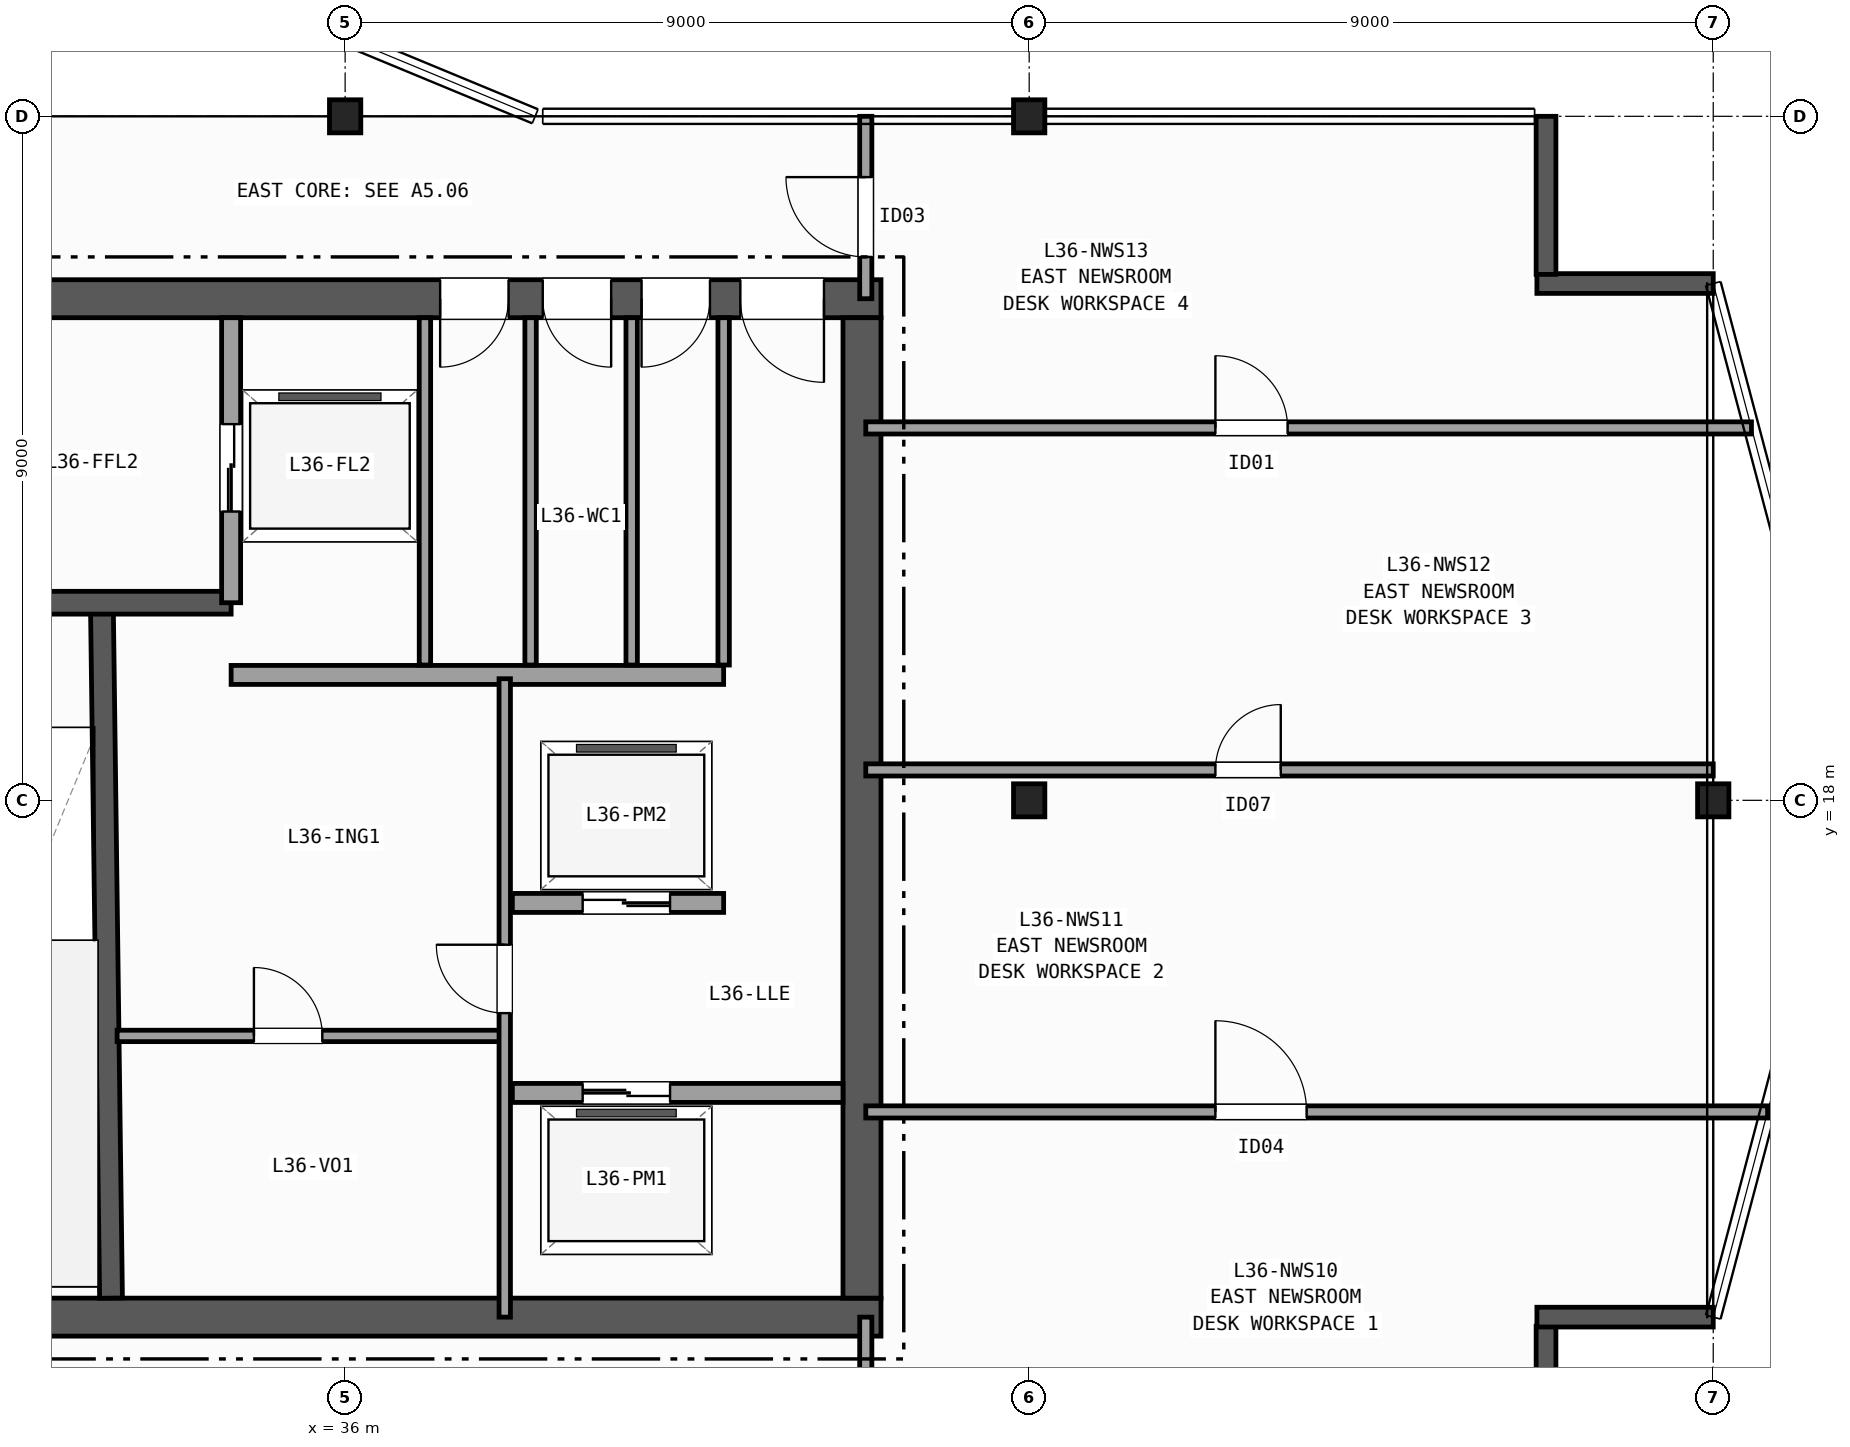
"""IFC4 building model, lengths in metres.
Left out: names, types, materials, properties, quantities, classifications, styles, units other than length and angle.
Written with IfcOpenShell. Run it as: python <this file> out.ifc"""

import sys

from ifc_helpers import new_model, si_unit, direction, frame, frame_2d, origin, origin_2d, place, context, subcontext, project, spatial, rectangle, i_section, extrude, element, fill, save


model = new_model("IFC4")
c1 = context("Model", 3, precision=1e-05, world=origin(), true_north=direction((0.0, 1.0)))
c2 = subcontext(c1, "Body", "Model", "MODEL_VIEW")
j1 = project(units=[si_unit("LENGTHUNIT", "METRE"), si_unit("PLANEANGLEUNIT", "RADIAN")], contexts=[c1])
p1 = place(None, origin())
s1 = spatial("IfcSite", under=j1, at=p1, CompositionType="ELEMENT")
p2 = place(p1, origin())
s2 = spatial("IfcBuilding", under=s1, at=p2, CompositionType="ELEMENT")
p3 = place(p2, frame((0.0, 0.0, 147.0)))
s3 = spatial("IfcBuildingStorey", under=s2, at=p3, CompositionType="ELEMENT", Elevation=147.0)
for number, where, z_axis, x_axis in (
    (1, (36.0, 27.0, 0.0), (0.0, 0.0, 1.0), (1.0, 0.0, 0.0)),
    (2, (45.0, 18.0, 0.0), (0.0, 0.0, 1.0), (1.0, 0.0, 0.0)),
    (3, (45.0, 27.0, 0.0), (0.0, 0.0, 1.0), (1.0, 0.0, 0.0)),
    (4, (54.0, 18.0, 0.0), (0.0, 0.0, 1.0), (1.0, 0.0, 0.0)),
):
    element("IfcColumn", number, at=place(p3, frame(where, z_axis=z_axis, x_axis=x_axis)), inside=s3, PredefinedType="COLUMN", context=c2, shape_type="SweptSolid", body=[
        extrude(i_section(OverallWidth=0.412, OverallDepth=0.435, WebThickness=0.036, FlangeThickness=0.057, FilletRadius=0.015, at=origin_2d()), origin(), (0.0, 0.0, 1.0), 3.7),
    ])
p4 = place(p3, frame((51.8, 9.0, 0.0), z_axis=(0.0, 0.0, 1.0), x_axis=(0.0, 1.0, 0.0)))
e5 = element("IfcWall", 5, at=p4, inside=s3, PredefinedType="SOLIDWALL", context=c2, shape_type="SweptSolid", body=[
    extrude(rectangle(XDim=2.08, YDim=0.26, at=frame_2d((1.04, 0.0))), origin(), (0.0, 0.0, 1.0), 3.42),
])
for number, where, z_axis, x_axis in (
    (6, (51.68, 11.2, 0.0), (0.0, 0.0, 1.0), (1.0, 0.0, 0.0)),
    (7, (54.0, 24.8, 0.0), (0.0, 0.0, 1.0), (-1.0, 0.0, 0.0)),
):
    element("IfcWall", number, at=place(p3, frame(where, z_axis=z_axis, x_axis=x_axis)), inside=s3, PredefinedType="SOLIDWALL", context=c2, shape_type="SweptSolid", body=[
        extrude(rectangle(XDim=2.32, YDim=0.26, at=frame_2d((1.16, 0.0))), origin(), (0.0, 0.0, 1.0), 3.42),
    ])
p5 = place(p3, frame((51.8, 24.92, 0.0), z_axis=(0.0, 0.0, 1.0), x_axis=(0.0, 1.0, 0.0)))
e8 = element("IfcWall", 8, at=p5, inside=s3, PredefinedType="SOLIDWALL", context=c2, shape_type="SweptSolid", body=[
    extrude(rectangle(XDim=2.08, YDim=0.26, at=frame_2d((1.04, 0.0))), origin(), (0.0, 0.0, 1.0), 3.42),
])
p6 = place(p3, frame((29.15, 11.2, 0.0), z_axis=(0.0, 0.0, 1.0), x_axis=(1.0, 0.0, 0.0)))
e9 = element("IfcWall", 9, at=p6, inside=s3, PredefinedType="SHEAR", context=c2, shape_type="SweptSolid", body=[
    extrude(rectangle(XDim=13.9, YDim=0.5, at=frame_2d((6.95, 0.0))), origin(), (0.0, 0.0, 1.0), 3.42),
])
p7 = place(p3, frame((43.05, 24.6, 0.0), z_axis=(0.0, 0.0, 1.0), x_axis=(-1.0, 0.0, 0.0)))
e10 = element("IfcWall", 10, at=p7, inside=s3, PredefinedType="SHEAR", context=c2, shape_type="SweptSolid", body=[
    extrude(rectangle(XDim=13.9, YDim=0.5, at=frame_2d((6.95, 0.0))), origin(), (0.0, 0.0, 1.0), 3.42),
])
p8 = place(p7, frame((0.75, 0.0, 0.0)))
e11 = element("IfcOpeningElement", 11, at=p8, cuts=e10, PredefinedType="OPENING", context=c2, shape_type="SweptSolid", body=[
    extrude(rectangle(XDim=1.1, YDim=2.15, at=frame_2d((0.55, 1.075))), frame((0.0, 0.26, 0.0), z_axis=(0.0, -1.0, 0.0), x_axis=(1.0, 0.0, 0.0)), (0.0, 0.0, 1.0), 0.52),
])
p9 = place(p7, frame((2.25, 0.0, 0.0)))
e12 = element("IfcOpeningElement", 12, at=p9, cuts=e10, PredefinedType="OPENING", context=c2, shape_type="SweptSolid", body=[
    extrude(rectangle(XDim=0.9, YDim=2.1, at=frame_2d((0.45, 1.05))), frame((0.0, 0.26, 0.0), z_axis=(0.0, -1.0, 0.0), x_axis=(1.0, 0.0, 0.0)), (0.0, 0.0, 1.0), 0.52),
])
p10 = place(p7, frame((3.55, 0.0, 0.0)))
e13 = element("IfcOpeningElement", 13, at=p10, cuts=e10, PredefinedType="OPENING", context=c2, shape_type="SweptSolid", body=[
    extrude(rectangle(XDim=0.9, YDim=2.1, at=frame_2d((0.45, 1.05))), frame((0.0, 0.26, 0.0), z_axis=(0.0, -1.0, 0.0), x_axis=(1.0, 0.0, 0.0)), (0.0, 0.0, 1.0), 0.52),
])
p11 = place(p7, frame((4.9, 0.0, 0.0)))
e14 = element("IfcOpeningElement", 14, at=p11, cuts=e10, PredefinedType="OPENING", context=c2, shape_type="SweptSolid", body=[
    extrude(rectangle(XDim=0.9, YDim=2.1, at=frame_2d((0.45, 1.05))), frame((0.0, 0.26, 0.0), z_axis=(0.0, -1.0, 0.0), x_axis=(1.0, 0.0, 0.0)), (0.0, 0.0, 1.0), 0.52),
])
p12 = place(p3, frame((42.8, 11.45, 0.0), z_axis=(0.0, 0.0, 1.0), x_axis=(0.0, 1.0, 0.0)))
e15 = element("IfcWall", 15, at=p12, inside=s3, PredefinedType="SHEAR", context=c2, shape_type="SweptSolid", body=[
    extrude(rectangle(XDim=12.9, YDim=0.5, at=frame_2d((6.45, 0.0))), origin(), (0.0, 0.0, 1.0), 3.42),
])
p13 = place(p3, frame((32.92, 11.45, 0.0), z_axis=(0.0, 0.0, 1.0), x_axis=(-0.013171578211, 0.999913251001, 0.0)))
e16 = element("IfcWall", 16, at=p13, inside=s3, PredefinedType="SHEAR", context=c2, shape_type="SweptSolid", body=[
    extrude(rectangle(XDim=9.101, YDim=0.3, at=frame_2d((4.55, 0.0))), origin(), (0.0, 0.0, 1.0), 3.42),
])
p14 = place(p3, frame((34.5, 20.6, 0.0), z_axis=(0.0, 0.0, 1.0), x_axis=(-1.0, 0.0, 0.0)))
e17 = element("IfcWall", 17, at=p14, inside=s3, PredefinedType="SHEAR", context=c2, shape_type="SweptSolid", body=[
    extrude(rectangle(XDim=4.85, YDim=0.3, at=frame_2d((2.425, 0.0))), origin(), (0.0, 0.0, 1.0), 3.42),
])
p15 = place(p14, frame((2.7, 0.0, 0.0)))
e18 = element("IfcOpeningElement", 18, at=p15, cuts=e17, PredefinedType="OPENING", context=c2, shape_type="SweptSolid", body=[
    extrude(rectangle(XDim=1.2, YDim=2.15, at=frame_2d((0.6, 1.075))), frame((0.0, 0.16, 0.0), z_axis=(0.0, -1.0, 0.0), x_axis=(1.0, 0.0, 0.0)), (0.0, 0.0, 1.0), 0.32),
])
p16 = place(p3, frame((34.5, 20.6, 0.0), z_axis=(0.0, 0.0, 1.0), x_axis=(0.0, 1.0, 0.0)))
e19 = element("IfcWall", 19, at=p16, inside=s3, PredefinedType="PARTITIONING", context=c2, shape_type="SweptSolid", body=[
    extrude(rectangle(XDim=3.75, YDim=0.25, at=frame_2d((1.875, 0.0))), origin(), (0.0, 0.0, 1.0), 3.42),
])
p17 = place(p16, frame((1.2, 0.0, 0.0)))
e20 = element("IfcOpeningElement", 20, at=p17, cuts=e19, PredefinedType="OPENING", context=c2, shape_type="SweptSolid", body=[
    extrude(rectangle(XDim=1.15, YDim=2.15, at=frame_2d((0.575, 1.075))), frame((0.0, 0.135, 0.0), z_axis=(0.0, -1.0, 0.0), x_axis=(1.0, 0.0, 0.0)), (0.0, 0.0, 1.0), 0.27),
])
p18 = place(p3, frame((34.5, 19.65, 0.0), z_axis=(0.0, 0.0, 1.0), x_axis=(1.0, 0.0, 0.0)))
e21 = element("IfcWall", 21, at=p18, inside=s3, PredefinedType="PARTITIONING", context=c2, shape_type="SweptSolid", body=[
    extrude(rectangle(XDim=6.48, YDim=0.25, at=frame_2d((3.24, 0.0))), origin(), (0.0, 0.0, 1.0), 3.42),
])
p19 = place(p3, frame((38.2, 14.15, 0.0), z_axis=(0.0, 0.0, 1.0), x_axis=(1.0, 0.0, 0.0)))
e22 = element("IfcWall", 22, at=p19, inside=s3, PredefinedType="PARTITIONING", context=c2, shape_type="SweptSolid", body=[
    extrude(rectangle(XDim=4.35, YDim=0.25, at=frame_2d((2.175, 0.0))), origin(), (0.0, 0.0, 1.0), 3.42),
])
p20 = place(p19, frame((0.925, 0.0, 0.0)))
e23 = element("IfcOpeningElement", 23, at=p20, cuts=e22, PredefinedType="OPENING", context=c2, shape_type="SweptSolid", body=[
    extrude(rectangle(XDim=1.15, YDim=2.15, at=frame_2d((0.575, 1.075))), frame((0.0, 0.135, 0.0), z_axis=(0.0, -1.0, 0.0), x_axis=(1.0, 0.0, 0.0)), (0.0, 0.0, 1.0), 0.27),
])
p21 = place(p3, frame((40.98, 16.65, 0.0), z_axis=(0.0, 0.0, 1.0), x_axis=(-1.0, 0.0, 0.0)))
e24 = element("IfcWall", 24, at=p21, inside=s3, PredefinedType="PARTITIONING", context=c2, shape_type="SweptSolid", body=[
    extrude(rectangle(XDim=2.78, YDim=0.25, at=frame_2d((1.39, 0.0))), origin(), (0.0, 0.0, 1.0), 3.42),
])
p22 = place(p21, frame((0.705, 0.0, 0.0)))
e25 = element("IfcOpeningElement", 25, at=p22, cuts=e24, PredefinedType="OPENING", context=c2, shape_type="SweptSolid", body=[
    extrude(rectangle(XDim=1.15, YDim=2.15, at=frame_2d((0.575, 1.075))), frame((0.0, 0.135, 0.0), z_axis=(0.0, -1.0, 0.0), x_axis=(1.0, 0.0, 0.0)), (0.0, 0.0, 1.0), 0.27),
])
p23 = place(p3, frame((33.0, 14.9, 0.0), z_axis=(0.0, 0.0, 1.0), x_axis=(1.0, 0.0, 0.0)))
e26 = element("IfcWall", 26, at=p23, inside=s3, PredefinedType="PARTITIONING", context=c2, shape_type="SweptSolid", body=[
    extrude(rectangle(XDim=5.1, YDim=0.15, at=frame_2d((2.55, 0.0))), origin(), (0.0, 0.0, 1.0), 3.42),
])
p24 = place(p23, frame((1.8, 0.0, 0.0)))
e27 = element("IfcOpeningElement", 27, at=p24, cuts=e26, PredefinedType="OPENING", context=c2, shape_type="SweptSolid", body=[
    extrude(rectangle(XDim=0.9, YDim=2.1, at=frame_2d((0.45, 1.05))), frame((0.0, 0.085, 0.0), z_axis=(0.0, -1.0, 0.0), x_axis=(1.0, 0.0, 0.0)), (0.0, 0.0, 1.0), 0.17),
])
p25 = place(p3, frame((38.1, 11.2, 0.0), z_axis=(0.0, 0.0, 1.0), x_axis=(0.0, 1.0, 0.0)))
e28 = element("IfcWall", 28, at=p25, inside=s3, PredefinedType="PARTITIONING", context=c2, shape_type="SweptSolid", body=[
    extrude(rectangle(XDim=8.4, YDim=0.15, at=frame_2d((4.2, 0.0))), origin(), (0.0, 0.0, 1.0), 3.42),
])
p26 = place(p25, frame((4.0, 0.0, 0.0)))
e29 = element("IfcOpeningElement", 29, at=p26, cuts=e28, PredefinedType="OPENING", context=c2, shape_type="SweptSolid", body=[
    extrude(rectangle(XDim=0.9, YDim=2.1, at=frame_2d((0.45, 1.05))), frame((0.0, 0.085, 0.0), z_axis=(0.0, -1.0, 0.0), x_axis=(1.0, 0.0, 0.0)), (0.0, 0.0, 1.0), 0.17),
])
for number, where, z_axis, x_axis in (
    (30, (37.05, 19.78, 0.0), (0.0, 0.0, 1.0), (0.0, 1.0, 0.0)),
    (31, (38.44, 19.78, 0.0), (0.0, 0.0, 1.0), (0.0, 1.0, 0.0)),
    (32, (39.77, 19.78, 0.0), (0.0, 0.0, 1.0), (0.0, 1.0, 0.0)),
    (33, (40.98, 19.78, 0.0), (0.0, 0.0, 1.0), (0.0, 1.0, 0.0)),
):
    element("IfcWall", number, at=place(p3, frame(where, z_axis=z_axis, x_axis=x_axis)), inside=s3, PredefinedType="PARTITIONING", context=c2, shape_type="SweptSolid", body=[
        extrude(rectangle(XDim=4.57, YDim=0.15, at=frame_2d((2.285, 0.0))), origin(), (0.0, 0.0, 1.0), 3.42),
    ])
p27 = place(p3, frame((42.85, 9.0, 0.0), z_axis=(0.0, 0.0, 1.0), x_axis=(0.0, 1.0, 0.0)))
e34 = element("IfcWall", 34, at=p27, inside=s3, PredefinedType="PARTITIONING", context=c2, shape_type="SweptSolid", body=[
    extrude(rectangle(XDim=2.2, YDim=0.16, at=frame_2d((1.1, 0.0))), origin(), (0.0, 0.0, 1.0), 2.634),
])
p28 = place(p3, frame((42.85, 24.6, 0.0), z_axis=(0.0, 0.0, 1.0), x_axis=(0.0, 1.0, 0.0)))
e35 = element("IfcWall", 35, at=p28, inside=s3, PredefinedType="PARTITIONING", context=c2, shape_type="SweptSolid", body=[
    extrude(rectangle(XDim=2.4, YDim=0.16, at=frame_2d((1.2, 0.0))), origin(), (0.0, 0.0, 1.0), 2.634),
])
p29 = place(p28, frame((0.55, 0.0, 0.0)))
e36 = element("IfcOpeningElement", 36, at=p29, cuts=e35, PredefinedType="OPENING", context=c2, shape_type="SweptSolid", body=[
    extrude(rectangle(XDim=1.05, YDim=2.15, at=frame_2d((0.525, 1.075))), frame((0.0, 0.09, 0.0), z_axis=(0.0, -1.0, 0.0), x_axis=(1.0, 0.0, 0.0)), (0.0, 0.0, 1.0), 0.18),
])
p30 = place(p3, frame((42.85, 13.9, 0.0), z_axis=(0.0, 0.0, 1.0), x_axis=(1.0, 0.0, 0.0)))
e37 = element("IfcWall", 37, at=p30, inside=s3, PredefinedType="PARTITIONING", context=c2, shape_type="SweptSolid", body=[
    extrude(rectangle(XDim=11.865, YDim=0.16, at=frame_2d((5.933, 0.0))), origin(), (0.0, 0.0, 1.0), 3.42),
])
p31 = place(p30, frame((4.6, 0.0, 0.0)))
e38 = element("IfcOpeningElement", 38, at=p31, cuts=e37, PredefinedType="OPENING", context=c2, shape_type="SweptSolid", body=[
    extrude(rectangle(XDim=1.2, YDim=2.15, at=frame_2d((0.6, 1.075))), frame((0.0, 0.09, 0.0), z_axis=(0.0, -1.0, 0.0), x_axis=(1.0, 0.0, 0.0)), (0.0, 0.0, 1.0), 0.18),
])
p32 = place(p3, frame((42.85, 18.4, 0.0), z_axis=(0.0, 0.0, 1.0), x_axis=(1.0, 0.0, 0.0)))
e39 = element("IfcWall", 39, at=p32, inside=s3, PredefinedType="PARTITIONING", context=c2, shape_type="SweptSolid", body=[
    extrude(rectangle(XDim=11.15, YDim=0.16, at=frame_2d((5.575, 0.0))), origin(), (0.0, 0.0, 1.0), 3.42),
])
p33 = place(p32, frame((4.6, 0.0, 0.0)))
e40 = element("IfcOpeningElement", 40, at=p33, cuts=e39, PredefinedType="OPENING", context=c2, shape_type="SweptSolid", body=[
    extrude(rectangle(XDim=0.86, YDim=2.05, at=frame_2d((0.43, 1.025))), frame((0.0, 0.09, 0.0), z_axis=(0.0, -1.0, 0.0), x_axis=(1.0, 0.0, 0.0)), (0.0, 0.0, 1.0), 0.18),
])
p34 = place(p3, frame((42.85, 22.9, 0.0), z_axis=(0.0, 0.0, 1.0), x_axis=(1.0, 0.0, 0.0)))
e41 = element("IfcWall", 41, at=p34, inside=s3, PredefinedType="PARTITIONING", context=c2, shape_type="SweptSolid", body=[
    extrude(rectangle(XDim=11.653, YDim=0.16, at=frame_2d((5.826, 0.0))), origin(), (0.0, 0.0, 1.0), 3.42),
])
p35 = place(p34, frame((4.6, 0.0, 0.0)))
e42 = element("IfcOpeningElement", 42, at=p35, cuts=e41, PredefinedType="OPENING", context=c2, shape_type="SweptSolid", body=[
    extrude(rectangle(XDim=0.95, YDim=2.1, at=frame_2d((0.475, 1.05))), frame((0.0, 0.09, 0.0), z_axis=(0.0, -1.0, 0.0), x_axis=(1.0, 0.0, 0.0)), (0.0, 0.0, 1.0), 0.18),
])
p36 = place(p8, origin())
e43 = element("IfcDoor", 43, at=p36, inside=s3, OperationType="SINGLE_SWING_LEFT", PredefinedType="DOOR", context=c2, shape_type="SweptSolid", body=[
    extrude(rectangle(XDim=1.1, YDim=2.15, at=frame_2d((0.55, 1.075))), frame((0.0, 0.025, 0.0), z_axis=(0.0, -1.0, 0.0), x_axis=(1.0, 0.0, 0.0)), (0.0, 0.0, 1.0), 0.05),
])
fill(e11, e43)
p37 = place(p9, origin())
e44 = element("IfcDoor", 44, at=p37, inside=s3, OperationType="SINGLE_SWING_RIGHT", PredefinedType="DOOR", context=c2, shape_type="SweptSolid", body=[
    extrude(rectangle(XDim=0.9, YDim=2.1, at=frame_2d((0.45, 1.05))), frame((0.0, 0.025, 0.0), z_axis=(0.0, -1.0, 0.0), x_axis=(1.0, 0.0, 0.0)), (0.0, 0.0, 1.0), 0.05),
])
fill(e12, e44)
p38 = place(p10, origin())
e45 = element("IfcDoor", 45, at=p38, inside=s3, OperationType="SINGLE_SWING_LEFT", PredefinedType="DOOR", context=c2, shape_type="SweptSolid", body=[
    extrude(rectangle(XDim=0.9, YDim=2.1, at=frame_2d((0.45, 1.05))), frame((0.0, 0.025, 0.0), z_axis=(0.0, -1.0, 0.0), x_axis=(1.0, 0.0, 0.0)), (0.0, 0.0, 1.0), 0.05),
])
fill(e13, e45)
p39 = place(p11, origin())
e46 = element("IfcDoor", 46, at=p39, inside=s3, OperationType="SINGLE_SWING_RIGHT", PredefinedType="DOOR", context=c2, shape_type="SweptSolid", body=[
    extrude(rectangle(XDim=0.9, YDim=2.1, at=frame_2d((0.45, 1.05))), frame((0.0, 0.025, 0.0), z_axis=(0.0, -1.0, 0.0), x_axis=(1.0, 0.0, 0.0)), (0.0, 0.0, 1.0), 0.05),
])
fill(e14, e46)
p40 = place(p17, origin())
e47 = element("IfcDoor", 47, at=p40, inside=s3, OperationType="DOUBLE_DOOR_SLIDING", PredefinedType="DOOR", context=c2, shape_type="SweptSolid", body=[
    extrude(rectangle(XDim=1.15, YDim=2.15, at=frame_2d((0.575, 1.075))), frame((0.0, 0.025, 0.0), z_axis=(0.0, -1.0, 0.0), x_axis=(1.0, 0.0, 0.0)), (0.0, 0.0, 1.0), 0.05),
])
fill(e20, e47)
p41 = place(p20, origin())
e48 = element("IfcDoor", 48, at=p41, inside=s3, OperationType="DOUBLE_DOOR_SLIDING", PredefinedType="DOOR", context=c2, shape_type="SweptSolid", body=[
    extrude(rectangle(XDim=1.15, YDim=2.15, at=frame_2d((0.575, 1.075))), frame((0.0, 0.025, 0.0), z_axis=(0.0, -1.0, 0.0), x_axis=(1.0, 0.0, 0.0)), (0.0, 0.0, 1.0), 0.05),
])
fill(e23, e48)
p42 = place(p22, origin())
e49 = element("IfcDoor", 49, at=p42, inside=s3, OperationType="DOUBLE_DOOR_SLIDING", PredefinedType="DOOR", context=c2, shape_type="SweptSolid", body=[
    extrude(rectangle(XDim=1.15, YDim=2.15, at=frame_2d((0.575, 1.075))), frame((0.0, 0.025, 0.0), z_axis=(0.0, -1.0, 0.0), x_axis=(1.0, 0.0, 0.0)), (0.0, 0.0, 1.0), 0.05),
])
fill(e25, e49)
p43 = place(p26, origin())
e50 = element("IfcDoor", 50, at=p43, inside=s3, OperationType="SINGLE_SWING_RIGHT", PredefinedType="DOOR", context=c2, shape_type="SweptSolid", body=[
    extrude(rectangle(XDim=0.9, YDim=2.1, at=frame_2d((0.45, 1.05))), frame((0.0, 0.025, 0.0), z_axis=(0.0, -1.0, 0.0), x_axis=(1.0, 0.0, 0.0)), (0.0, 0.0, 1.0), 0.05),
])
fill(e29, e50)
p44 = place(p24, origin())
e51 = element("IfcDoor", 51, at=p44, inside=s3, OperationType="SINGLE_SWING_LEFT", PredefinedType="DOOR", context=c2, shape_type="SweptSolid", body=[
    extrude(rectangle(XDim=0.9, YDim=2.1, at=frame_2d((0.45, 1.05))), frame((0.0, 0.025, 0.0), z_axis=(0.0, -1.0, 0.0), x_axis=(1.0, 0.0, 0.0)), (0.0, 0.0, 1.0), 0.05),
])
fill(e27, e51)
p45 = place(p29, origin())
e52 = element("IfcDoor", 52, at=p45, inside=s3, OperationType="SINGLE_SWING_RIGHT", PredefinedType="DOOR", context=c2, shape_type="SweptSolid", body=[
    extrude(rectangle(XDim=1.05, YDim=2.15, at=frame_2d((0.525, 1.075))), frame((0.0, 0.025, 0.0), z_axis=(0.0, -1.0, 0.0), x_axis=(1.0, 0.0, 0.0)), (0.0, 0.0, 1.0), 0.05),
])
fill(e36, e52)
p46 = place(p31, origin())
e53 = element("IfcDoor", 53, at=p46, inside=s3, OperationType="SINGLE_SWING_LEFT", PredefinedType="DOOR", context=c2, shape_type="SweptSolid", body=[
    extrude(rectangle(XDim=1.2, YDim=2.15, at=frame_2d((0.6, 1.075))), frame((0.0, 0.025, 0.0), z_axis=(0.0, -1.0, 0.0), x_axis=(1.0, 0.0, 0.0)), (0.0, 0.0, 1.0), 0.05),
])
fill(e38, e53)
p47 = place(p33, origin())
e54 = element("IfcDoor", 54, at=p47, inside=s3, OperationType="SINGLE_SWING_RIGHT", PredefinedType="DOOR", context=c2, shape_type="SweptSolid", body=[
    extrude(rectangle(XDim=0.86, YDim=2.05, at=frame_2d((0.43, 1.025))), frame((0.0, 0.025, 0.0), z_axis=(0.0, -1.0, 0.0), x_axis=(1.0, 0.0, 0.0)), (0.0, 0.0, 1.0), 0.05),
])
fill(e40, e54)
p48 = place(p35, origin())
e55 = element("IfcDoor", 55, at=p48, inside=s3, OperationType="SINGLE_SWING_LEFT", PredefinedType="DOOR", context=c2, shape_type="SweptSolid", body=[
    extrude(rectangle(XDim=0.95, YDim=2.1, at=frame_2d((0.475, 1.05))), frame((0.0, 0.025, 0.0), z_axis=(0.0, -1.0, 0.0), x_axis=(1.0, 0.0, 0.0)), (0.0, 0.0, 1.0), 0.05),
])
fill(e42, e55)
save(model, sys.argv[1])
